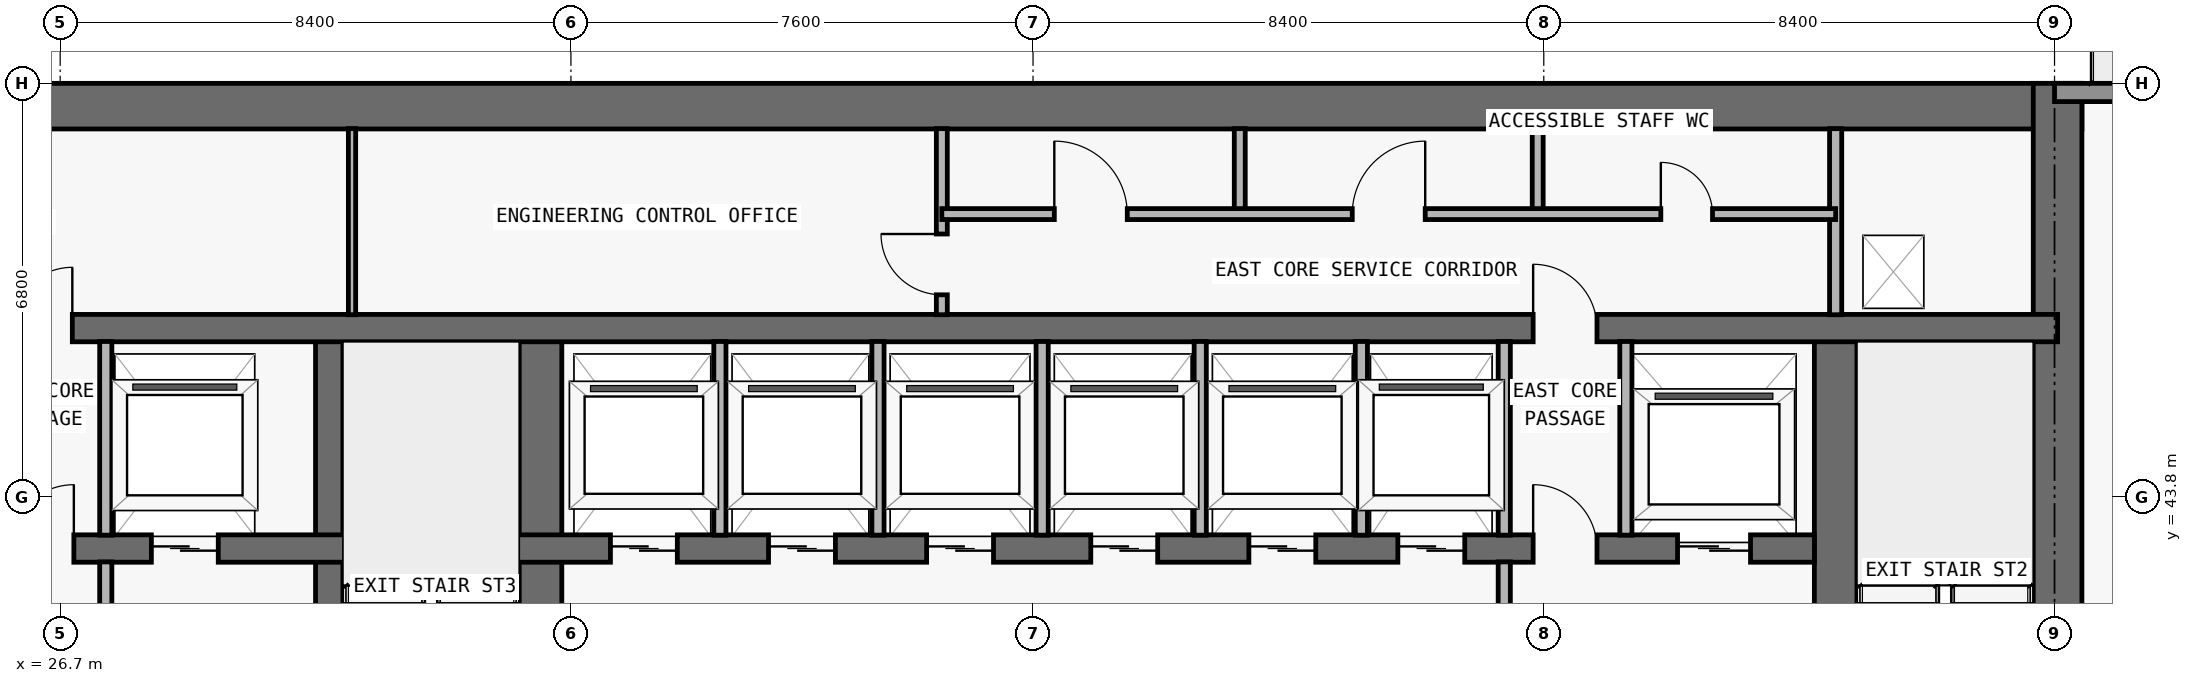
"""IFC4 building model, lengths in metres.
Left out: names, types, materials, properties, quantities, classifications, styles, units other than length and angle.
Written with IfcOpenShell. Run it as: python <this file> out.ifc"""

import sys

from ifc_helpers import new_model, si_unit, direction, frame, frame_2d, origin, place, context, subcontext, project, spatial, rectangle, extrude, element, fill, save


model = new_model("IFC4")
c1 = context("Model", 3, precision=1e-05, world=origin(), true_north=direction((0.0, 1.0)))
c2 = subcontext(c1, "Body", "Model", "MODEL_VIEW")
j1 = project(units=[si_unit("LENGTHUNIT", "METRE"), si_unit("PLANEANGLEUNIT", "RADIAN")], contexts=[c1])
p1 = place(None, origin())
s1 = spatial("IfcSite", under=j1, at=p1, CompositionType="ELEMENT")
p2 = place(p1, origin())
s2 = spatial("IfcBuilding", under=s1, at=p2, CompositionType="ELEMENT")
p3 = place(p2, frame((0.0, 0.0, 97.8)))
s3 = spatial("IfcBuildingStorey", under=s2, at=p3, CompositionType="ELEMENT", Elevation=97.8)
p4 = place(p3, frame((17.85, 50.225, 0.0), z_axis=(0.0, 0.0, 1.0), x_axis=(1.0, 0.0, 0.0)))
e1 = element("IfcWall", 1, at=p4, inside=s3, PredefinedType="SHEAR", context=c2, shape_type="SweptSolid", body=[
    extrude(rectangle(XDim=42.1, YDim=0.75, at=frame_2d((21.05, 0.0))), origin(), (0.0, 0.0, 1.0), 4.55),
])
p5 = place(p3, frame((59.55, 36.55, 0.0), z_axis=(0.0, 0.0, 1.0), x_axis=(0.0, 1.0, 0.0)))
e2 = element("IfcWall", 2, at=p5, inside=s3, PredefinedType="SHEAR", context=c2, shape_type="SweptSolid", body=[
    extrude(rectangle(XDim=14.05, YDim=0.8, at=frame_2d((7.025, 0.0))), origin(), (0.0, 0.0, 1.0), 4.55),
])
p6 = place(p3, frame((55.9, 36.95, 0.0), z_axis=(0.0, 0.0, 1.0), x_axis=(0.0, 1.0, 0.0)))
e3 = element("IfcWall", 3, at=p6, inside=s3, PredefinedType="SHEAR", context=c2, shape_type="SweptSolid", body=[
    extrude(rectangle(XDim=9.625, YDim=0.7, at=frame_2d((4.812, 0.0))), origin(), (0.0, 0.0, 1.0), 4.55),
])
p7 = place(p6, frame((0.6, 0.0, 0.0)))
e4 = element("IfcOpeningElement", 4, at=p7, cuts=e3, PredefinedType="OPENING", context=c2, shape_type="SweptSolid", body=[
    extrude(rectangle(XDim=1.1, YDim=2.15, at=frame_2d((0.55, 1.075))), frame((0.0, 0.36, 0.0), z_axis=(0.0, -1.0, 0.0), x_axis=(1.0, 0.0, 0.0)), (0.0, 0.0, 1.0), 0.72),
])
p8 = place(p3, frame((31.125, 36.95, 0.0), z_axis=(0.0, 0.0, 1.0), x_axis=(0.0, 1.0, 0.0)))
e5 = element("IfcWall", 5, at=p8, inside=s3, PredefinedType="SHEAR", context=c2, shape_type="SweptSolid", body=[
    extrude(rectangle(XDim=9.625, YDim=0.45, at=frame_2d((4.812, 0.0))), origin(), (0.0, 0.0, 1.0), 4.55),
])
p9 = place(p3, frame((34.6, 36.95, 0.0), z_axis=(0.0, 0.0, 1.0), x_axis=(0.0, 1.0, 0.0)))
e6 = element("IfcWall", 6, at=p9, inside=s3, PredefinedType="SHEAR", context=c2, shape_type="SweptSolid", body=[
    extrude(rectangle(XDim=9.625, YDim=0.7, at=frame_2d((4.812, 0.0))), origin(), (0.0, 0.0, 1.0), 4.55),
])
p10 = place(p3, frame((22.25, 42.95, 0.0), z_axis=(0.0, 0.0, 1.0), x_axis=(1.0, 0.0, 0.0)))
e7 = element("IfcWall", 7, at=p10, inside=s3, PredefinedType="SHEAR", context=c2, shape_type="SweptSolid", body=[
    extrude(rectangle(XDim=33.3, YDim=0.45, at=frame_2d((16.65, 0.0))), origin(), (0.0, 0.0, 1.0), 4.55),
])
p11 = place(p10, frame((1.05, 0.0, 0.0)))
e8 = element("IfcOpeningElement", 8, at=p11, cuts=e7, PredefinedType="OPENING", context=c2, shape_type="SweptSolid", body=[
    extrude(rectangle(XDim=1.2, YDim=2.2, at=frame_2d((0.6, 1.1))), frame((0.0, 0.235, 0.0), z_axis=(0.0, -1.0, 0.0), x_axis=(1.0, 0.0, 0.0)), (0.0, 0.0, 1.0), 0.47),
])
p12 = place(p10, frame((31.05, 0.0, 0.0)))
e9 = element("IfcOpeningElement", 9, at=p12, cuts=e7, PredefinedType="OPENING", context=c2, shape_type="SweptSolid", body=[
    extrude(rectangle(XDim=1.2, YDim=2.2, at=frame_2d((0.6, 1.1))), frame((0.0, 0.235, 0.0), z_axis=(0.0, -1.0, 0.0), x_axis=(1.0, 0.0, 0.0)), (0.0, 0.0, 1.0), 0.47),
])
p13 = place(p10, frame((13.5, 0.0, 0.0)))
e10 = element("IfcOpeningElement", 10, at=p13, cuts=e7, PredefinedType="OPENING", context=c2, shape_type="SweptSolid", body=[
    extrude(rectangle(XDim=1.1, YDim=2.2, at=frame_2d((0.55, 1.1))), frame((0.0, 0.235, 0.0), z_axis=(0.0, -1.0, 0.0), x_axis=(1.0, 0.0, 0.0)), (0.0, 0.0, 1.0), 0.47),
])
p14 = place(p10, frame((16.1, 0.0, 0.0)))
e11 = element("IfcOpeningElement", 11, at=p14, cuts=e7, PredefinedType="OPENING", context=c2, shape_type="SweptSolid", body=[
    extrude(rectangle(XDim=1.1, YDim=2.2, at=frame_2d((0.55, 1.1))), frame((0.0, 0.235, 0.0), z_axis=(0.0, -1.0, 0.0), x_axis=(1.0, 0.0, 0.0)), (0.0, 0.0, 1.0), 0.47),
])
p15 = place(p10, frame((18.7, 0.0, 0.0)))
e12 = element("IfcOpeningElement", 12, at=p15, cuts=e7, PredefinedType="OPENING", context=c2, shape_type="SweptSolid", body=[
    extrude(rectangle(XDim=1.1, YDim=2.2, at=frame_2d((0.55, 1.1))), frame((0.0, 0.235, 0.0), z_axis=(0.0, -1.0, 0.0), x_axis=(1.0, 0.0, 0.0)), (0.0, 0.0, 1.0), 0.47),
])
p16 = place(p10, frame((21.4, 0.0, 0.0)))
e13 = element("IfcOpeningElement", 13, at=p16, cuts=e7, PredefinedType="OPENING", context=c2, shape_type="SweptSolid", body=[
    extrude(rectangle(XDim=1.1, YDim=2.2, at=frame_2d((0.55, 1.1))), frame((0.0, 0.235, 0.0), z_axis=(0.0, -1.0, 0.0), x_axis=(1.0, 0.0, 0.0)), (0.0, 0.0, 1.0), 0.47),
])
p17 = place(p10, frame((24.0, 0.0, 0.0)))
e14 = element("IfcOpeningElement", 14, at=p17, cuts=e7, PredefinedType="OPENING", context=c2, shape_type="SweptSolid", body=[
    extrude(rectangle(XDim=1.1, YDim=2.2, at=frame_2d((0.55, 1.1))), frame((0.0, 0.235, 0.0), z_axis=(0.0, -1.0, 0.0), x_axis=(1.0, 0.0, 0.0)), (0.0, 0.0, 1.0), 0.47),
])
p18 = place(p10, frame((26.45, 0.0, 0.0)))
e15 = element("IfcOpeningElement", 15, at=p18, cuts=e7, PredefinedType="OPENING", context=c2, shape_type="SweptSolid", body=[
    extrude(rectangle(XDim=1.1, YDim=2.2, at=frame_2d((0.55, 1.1))), frame((0.0, 0.235, 0.0), z_axis=(0.0, -1.0, 0.0), x_axis=(1.0, 0.0, 0.0)), (0.0, 0.0, 1.0), 0.47),
])
p19 = place(p10, frame((5.95, 0.0, 0.0)))
e16 = element("IfcOpeningElement", 16, at=p19, cuts=e7, PredefinedType="OPENING", context=c2, shape_type="SweptSolid", body=[
    extrude(rectangle(XDim=1.1, YDim=2.2, at=frame_2d((0.55, 1.1))), frame((0.0, 0.235, 0.0), z_axis=(0.0, -1.0, 0.0), x_axis=(1.0, 0.0, 0.0)), (0.0, 0.0, 1.0), 0.47),
])
p20 = place(p10, frame((3.625, 0.0, 0.0)))
e17 = element("IfcOpeningElement", 17, at=p20, cuts=e7, PredefinedType="OPENING", context=c2, shape_type="SweptSolid", body=[
    extrude(rectangle(XDim=1.05, YDim=2.15, at=frame_2d((0.525, 1.075))), frame((0.0, 0.235, 0.0), z_axis=(0.0, -1.0, 0.0), x_axis=(1.0, 0.0, 0.0)), (0.0, 0.0, 1.0), 0.47),
])
p21 = place(p10, frame((28.675, 0.0, 0.0)))
e18 = element("IfcOpeningElement", 18, at=p21, cuts=e7, PredefinedType="OPENING", context=c2, shape_type="SweptSolid", body=[
    extrude(rectangle(XDim=1.05, YDim=2.15, at=frame_2d((0.525, 1.075))), frame((0.0, 0.235, 0.0), z_axis=(0.0, -1.0, 0.0), x_axis=(1.0, 0.0, 0.0)), (0.0, 0.0, 1.0), 0.47),
])
p22 = place(p3, frame((18.25, 46.575, 0.0), z_axis=(0.0, 0.0, 1.0), x_axis=(1.0, 0.0, 0.0)))
e19 = element("IfcWall", 19, at=p22, inside=s3, PredefinedType="SHEAR", context=c2, shape_type="SweptSolid", body=[
    extrude(rectangle(XDim=41.3, YDim=0.45, at=frame_2d((20.65, 0.0))), origin(), (0.0, 0.0, 1.0), 4.55),
])
p23 = place(p22, frame((7.65, 0.0, 0.0)))
e20 = element("IfcOpeningElement", 20, at=p23, cuts=e19, PredefinedType="OPENING", context=c2, shape_type="SweptSolid", body=[
    extrude(rectangle(XDim=1.0, YDim=2.2, at=frame_2d((0.5, 1.1))), frame((0.0, 0.235, 0.0), z_axis=(0.0, -1.0, 0.0), x_axis=(1.0, 0.0, 0.0)), (0.0, 0.0, 1.0), 0.47),
])
p24 = place(p22, frame((32.675, 0.0, 0.0)))
e21 = element("IfcOpeningElement", 21, at=p24, cuts=e19, PredefinedType="OPENING", context=c2, shape_type="SweptSolid", body=[
    extrude(rectangle(XDim=1.05, YDim=2.15, at=frame_2d((0.525, 1.075))), frame((0.0, 0.235, 0.0), z_axis=(0.0, -1.0, 0.0), x_axis=(1.0, 0.0, 0.0)), (0.0, 0.0, 1.0), 0.47),
])
p25 = place(p3, frame((59.5, 50.45, 0.0), z_axis=(0.0, 0.0, 1.0), x_axis=(1.0, 0.0, 0.0)))
e22 = element("IfcWall", 22, at=p25, inside=s3, PredefinedType="STANDARD", context=c2, shape_type="SweptSolid", body=[
    extrude(rectangle(XDim=10.6, YDim=0.3, at=frame_2d((5.3, 0.0))), origin(), (0.0, 0.0, 1.0), 4.55),
])
p26 = place(p25, frame((4.3, 0.0, 0.0)))
e23 = element("IfcOpeningElement", 23, at=p26, cuts=e22, PredefinedType="OPENING", context=c2, shape_type="SweptSolid", body=[
    extrude(rectangle(XDim=2.0, YDim=2.3, at=frame_2d((1.0, 1.15))), frame((0.0, 0.16, 0.0), z_axis=(0.0, -1.0, 0.0), x_axis=(1.0, 0.0, 0.0)), (0.0, 0.0, 1.0), 0.32),
])
p27 = place(p3, frame((27.45, 37.345, 0.0), z_axis=(0.0, 0.0, 1.0), x_axis=(0.0, 1.0, 0.0)))
e24 = element("IfcWall", 24, at=p27, inside=s3, PredefinedType="PARTITIONING", context=c2, shape_type="SweptSolid", body=[
    extrude(rectangle(XDim=5.385, YDim=0.2, at=frame_2d((2.692, 0.0))), origin(), (0.0, 0.0, 1.0), 4.55),
])
p28 = place(p3, frame((27.45, 43.17, 0.0), z_axis=(0.0, 0.0, 1.0), x_axis=(0.0, 1.0, 0.0)))
e25 = element("IfcWall", 25, at=p28, inside=s3, PredefinedType="PARTITIONING", context=c2, shape_type="SweptSolid", body=[
    extrude(rectangle(XDim=3.185, YDim=0.2, at=frame_2d((1.593, 0.0))), origin(), (0.0, 0.0, 1.0), 4.55),
])
p29 = place(p3, frame((31.5, 46.795, 0.0), z_axis=(0.0, 0.0, 1.0), x_axis=(0.0, 1.0, 0.0)))
e26 = element("IfcWall", 26, at=p29, inside=s3, PredefinedType="PARTITIONING", context=c2, shape_type="SweptSolid", body=[
    extrude(rectangle(XDim=3.06, YDim=0.12, at=frame_2d((1.53, 0.0))), origin(), (0.0, 0.0, 1.0), 4.55),
])
for number, where, z_axis, x_axis in (
    (27, (37.55, 43.17, 0.0), (0.0, 0.0, 1.0), (0.0, 1.0, 0.0)),
    (28, (40.15, 43.17, 0.0), (0.0, 0.0, 1.0), (0.0, 1.0, 0.0)),
):
    element("IfcWall", number, at=place(p3, frame(where, z_axis=z_axis, x_axis=x_axis)), inside=s3, PredefinedType="PARTITIONING", context=c2, shape_type="SweptSolid", body=[
        extrude(rectangle(XDim=3.185, YDim=0.2, at=frame_2d((1.593, 0.0))), origin(), (0.0, 0.0, 1.0), 4.55),
    ])
p30 = place(p3, frame((41.2, 46.795, 0.0), z_axis=(0.0, 0.0, 1.0), x_axis=(0.0, 1.0, 0.0)))
e29 = element("IfcWall", 29, at=p30, inside=s3, PredefinedType="PARTITIONING", context=c2, shape_type="SweptSolid", body=[
    extrude(rectangle(XDim=3.06, YDim=0.18, at=frame_2d((1.53, 0.0))), origin(), (0.0, 0.0, 1.0), 4.55),
])
p31 = place(p30, frame((0.327, 0.0, 0.0)))
e30 = element("IfcOpeningElement", 30, at=p31, cuts=e29, PredefinedType="OPENING", context=c2, shape_type="SweptSolid", body=[
    extrude(rectangle(XDim=1.0, YDim=2.2, at=frame_2d((0.5, 1.1))), frame((0.0, 0.1, 0.0), z_axis=(0.0, -1.0, 0.0), x_axis=(1.0, 0.0, 0.0)), (0.0, 0.0, 1.0), 0.2),
])
for number, where, z_axis, x_axis in (
    (31, (42.85, 43.17, 0.0), (0.0, 0.0, 1.0), (0.0, 1.0, 0.0)),
    (32, (45.45, 43.17, 0.0), (0.0, 0.0, 1.0), (0.0, 1.0, 0.0)),
):
    element("IfcWall", number, at=place(p3, frame(where, z_axis=z_axis, x_axis=x_axis)), inside=s3, PredefinedType="PARTITIONING", context=c2, shape_type="SweptSolid", body=[
        extrude(rectangle(XDim=3.185, YDim=0.2, at=frame_2d((1.593, 0.0))), origin(), (0.0, 0.0, 1.0), 4.55),
    ])
p32 = place(p3, frame((46.1, 48.45, 0.0), z_axis=(0.0, 0.0, 1.0), x_axis=(0.0, 1.0, 0.0)))
e33 = element("IfcWall", 33, at=p32, inside=s3, PredefinedType="PARTITIONING", context=c2, shape_type="SweptSolid", body=[
    extrude(rectangle(XDim=1.405, YDim=0.18, at=frame_2d((0.703, 0.0))), origin(), (0.0, 0.0, 1.0), 4.55),
])
p33 = place(p3, frame((48.1, 43.17, 0.0), z_axis=(0.0, 0.0, 1.0), x_axis=(0.0, 1.0, 0.0)))
e34 = element("IfcWall", 34, at=p33, inside=s3, PredefinedType="PARTITIONING", context=c2, shape_type="SweptSolid", body=[
    extrude(rectangle(XDim=3.185, YDim=0.2, at=frame_2d((1.593, 0.0))), origin(), (0.0, 0.0, 1.0), 4.55),
])
p34 = place(p3, frame((50.45, 37.345, 0.0), z_axis=(0.0, 0.0, 1.0), x_axis=(0.0, 1.0, 0.0)))
e35 = element("IfcWall", 35, at=p34, inside=s3, PredefinedType="PARTITIONING", context=c2, shape_type="SweptSolid", body=[
    extrude(rectangle(XDim=5.385, YDim=0.2, at=frame_2d((2.692, 0.0))), origin(), (0.0, 0.0, 1.0), 4.55),
])
p35 = place(p3, frame((50.45, 43.17, 0.0), z_axis=(0.0, 0.0, 1.0), x_axis=(0.0, 1.0, 0.0)))
e36 = element("IfcWall", 36, at=p35, inside=s3, PredefinedType="PARTITIONING", context=c2, shape_type="SweptSolid", body=[
    extrude(rectangle(XDim=3.185, YDim=0.2, at=frame_2d((1.593, 0.0))), origin(), (0.0, 0.0, 1.0), 4.55),
])
p36 = place(p3, frame((51.0, 48.45, 0.0), z_axis=(0.0, 0.0, 1.0), x_axis=(0.0, 1.0, 0.0)))
e37 = element("IfcWall", 37, at=p36, inside=s3, PredefinedType="PARTITIONING", context=c2, shape_type="SweptSolid", body=[
    extrude(rectangle(XDim=1.405, YDim=0.18, at=frame_2d((0.703, 0.0))), origin(), (0.0, 0.0, 1.0), 4.55),
])
p37 = place(p3, frame((52.45, 43.17, 0.0), z_axis=(0.0, 0.0, 1.0), x_axis=(0.0, 1.0, 0.0)))
e38 = element("IfcWall", 38, at=p37, inside=s3, PredefinedType="PARTITIONING", context=c2, shape_type="SweptSolid", body=[
    extrude(rectangle(XDim=3.185, YDim=0.2, at=frame_2d((1.593, 0.0))), origin(), (0.0, 0.0, 1.0), 4.55),
])
p38 = place(p3, frame((55.9, 46.795, 0.0), z_axis=(0.0, 0.0, 1.0), x_axis=(0.0, 1.0, 0.0)))
e39 = element("IfcWall", 39, at=p38, inside=s3, PredefinedType="PARTITIONING", context=c2, shape_type="SweptSolid", body=[
    extrude(rectangle(XDim=3.06, YDim=0.2, at=frame_2d((1.53, 0.0))), origin(), (0.0, 0.0, 1.0), 4.55),
])
p39 = place(p3, frame((41.2, 48.45, 0.0), z_axis=(0.0, 0.0, 1.0), x_axis=(1.0, 0.0, 0.0)))
e40 = element("IfcWall", 40, at=p39, inside=s3, PredefinedType="PARTITIONING", context=c2, shape_type="SweptSolid", body=[
    extrude(rectangle(XDim=14.7, YDim=0.18, at=frame_2d((7.35, 0.0))), origin(), (0.0, 0.0, 1.0), 4.55),
])
p40 = place(p39, frame((1.85, 0.0, 0.0)))
e41 = element("IfcOpeningElement", 41, at=p40, cuts=e40, PredefinedType="OPENING", context=c2, shape_type="SweptSolid", body=[
    extrude(rectangle(XDim=1.2, YDim=2.2, at=frame_2d((0.6, 1.1))), frame((0.0, 0.1, 0.0), z_axis=(0.0, -1.0, 0.0), x_axis=(1.0, 0.0, 0.0)), (0.0, 0.0, 1.0), 0.2),
])
p41 = place(p39, frame((6.75, 0.0, 0.0)))
e42 = element("IfcOpeningElement", 42, at=p41, cuts=e40, PredefinedType="OPENING", context=c2, shape_type="SweptSolid", body=[
    extrude(rectangle(XDim=1.2, YDim=2.2, at=frame_2d((0.6, 1.1))), frame((0.0, 0.1, 0.0), z_axis=(0.0, -1.0, 0.0), x_axis=(1.0, 0.0, 0.0)), (0.0, 0.0, 1.0), 0.2),
])
p42 = place(p39, frame((11.825, 0.0, 0.0)))
e43 = element("IfcOpeningElement", 43, at=p42, cuts=e40, PredefinedType="OPENING", context=c2, shape_type="SweptSolid", body=[
    extrude(rectangle(XDim=0.85, YDim=2.1, at=frame_2d((0.425, 1.05))), frame((0.0, 0.1, 0.0), z_axis=(0.0, -1.0, 0.0), x_axis=(1.0, 0.0, 0.0)), (0.0, 0.0, 1.0), 0.2),
])
p43 = place(p12, origin())
e44 = element("IfcDoor", 44, at=p43, inside=s3, OperationType="DOUBLE_DOOR_SLIDING", PredefinedType="DOOR", context=c2, shape_type="SweptSolid", body=[
    extrude(rectangle(XDim=1.2, YDim=2.2, at=frame_2d((0.6, 1.1))), frame((0.0, 0.025, 0.0), z_axis=(0.0, -1.0, 0.0), x_axis=(1.0, 0.0, 0.0)), (0.0, 0.0, 1.0), 0.05),
])
fill(e9, e44)
p44 = place(p13, origin())
e45 = element("IfcDoor", 45, at=p44, inside=s3, OperationType="DOUBLE_DOOR_SLIDING", PredefinedType="DOOR", context=c2, shape_type="SweptSolid", body=[
    extrude(rectangle(XDim=1.1, YDim=2.2, at=frame_2d((0.55, 1.1))), frame((0.0, 0.025, 0.0), z_axis=(0.0, -1.0, 0.0), x_axis=(1.0, 0.0, 0.0)), (0.0, 0.0, 1.0), 0.05),
])
fill(e10, e45)
p45 = place(p14, origin())
e46 = element("IfcDoor", 46, at=p45, inside=s3, OperationType="DOUBLE_DOOR_SLIDING", PredefinedType="DOOR", context=c2, shape_type="SweptSolid", body=[
    extrude(rectangle(XDim=1.1, YDim=2.2, at=frame_2d((0.55, 1.1))), frame((0.0, 0.025, 0.0), z_axis=(0.0, -1.0, 0.0), x_axis=(1.0, 0.0, 0.0)), (0.0, 0.0, 1.0), 0.05),
])
fill(e11, e46)
p46 = place(p15, origin())
e47 = element("IfcDoor", 47, at=p46, inside=s3, OperationType="DOUBLE_DOOR_SLIDING", PredefinedType="DOOR", context=c2, shape_type="SweptSolid", body=[
    extrude(rectangle(XDim=1.1, YDim=2.2, at=frame_2d((0.55, 1.1))), frame((0.0, 0.025, 0.0), z_axis=(0.0, -1.0, 0.0), x_axis=(1.0, 0.0, 0.0)), (0.0, 0.0, 1.0), 0.05),
])
fill(e12, e47)
p47 = place(p16, origin())
e48 = element("IfcDoor", 48, at=p47, inside=s3, OperationType="DOUBLE_DOOR_SLIDING", PredefinedType="DOOR", context=c2, shape_type="SweptSolid", body=[
    extrude(rectangle(XDim=1.1, YDim=2.2, at=frame_2d((0.55, 1.1))), frame((0.0, 0.025, 0.0), z_axis=(0.0, -1.0, 0.0), x_axis=(1.0, 0.0, 0.0)), (0.0, 0.0, 1.0), 0.05),
])
fill(e13, e48)
p48 = place(p17, origin())
e49 = element("IfcDoor", 49, at=p48, inside=s3, OperationType="DOUBLE_DOOR_SLIDING", PredefinedType="DOOR", context=c2, shape_type="SweptSolid", body=[
    extrude(rectangle(XDim=1.1, YDim=2.2, at=frame_2d((0.55, 1.1))), frame((0.0, 0.025, 0.0), z_axis=(0.0, -1.0, 0.0), x_axis=(1.0, 0.0, 0.0)), (0.0, 0.0, 1.0), 0.05),
])
fill(e14, e49)
p49 = place(p18, origin())
e50 = element("IfcDoor", 50, at=p49, inside=s3, OperationType="DOUBLE_DOOR_SLIDING", PredefinedType="DOOR", context=c2, shape_type="SweptSolid", body=[
    extrude(rectangle(XDim=1.1, YDim=2.2, at=frame_2d((0.55, 1.1))), frame((0.0, 0.025, 0.0), z_axis=(0.0, -1.0, 0.0), x_axis=(1.0, 0.0, 0.0)), (0.0, 0.0, 1.0), 0.05),
])
fill(e15, e50)
p50 = place(p19, origin())
e51 = element("IfcDoor", 51, at=p50, inside=s3, OperationType="DOUBLE_DOOR_SLIDING", PredefinedType="DOOR", context=c2, shape_type="SweptSolid", body=[
    extrude(rectangle(XDim=1.1, YDim=2.2, at=frame_2d((0.55, 1.1))), frame((0.0, 0.025, 0.0), z_axis=(0.0, -1.0, 0.0), x_axis=(1.0, 0.0, 0.0)), (0.0, 0.0, 1.0), 0.05),
])
fill(e16, e51)
p51 = place(p20, origin())
e52 = element("IfcDoor", 52, at=p51, inside=s3, OperationType="SINGLE_SWING_RIGHT", PredefinedType="DOOR", context=c2, shape_type="SweptSolid", body=[
    extrude(rectangle(XDim=1.05, YDim=2.15, at=frame_2d((0.525, 1.075))), frame((0.0, 0.025, 0.0), z_axis=(0.0, -1.0, 0.0), x_axis=(1.0, 0.0, 0.0)), (0.0, 0.0, 1.0), 0.05),
])
fill(e17, e52)
p52 = place(p21, origin())
e53 = element("IfcDoor", 53, at=p52, inside=s3, OperationType="SINGLE_SWING_LEFT", PredefinedType="DOOR", context=c2, shape_type="SweptSolid", body=[
    extrude(rectangle(XDim=1.05, YDim=2.15, at=frame_2d((0.525, 1.075))), frame((0.0, 0.025, 0.0), z_axis=(0.0, -1.0, 0.0), x_axis=(1.0, 0.0, 0.0)), (0.0, 0.0, 1.0), 0.05),
])
fill(e18, e53)
p53 = place(p23, origin())
e54 = element("IfcDoor", 54, at=p53, inside=s3, OperationType="SINGLE_SWING_RIGHT", PredefinedType="DOOR", context=c2, shape_type="SweptSolid", body=[
    extrude(rectangle(XDim=1.0, YDim=2.2, at=frame_2d((0.5, 1.1))), frame((0.0, 0.025, 0.0), z_axis=(0.0, -1.0, 0.0), x_axis=(1.0, 0.0, 0.0)), (0.0, 0.0, 1.0), 0.05),
])
fill(e20, e54)
p54 = place(p24, origin())
e55 = element("IfcDoor", 55, at=p54, inside=s3, OperationType="SINGLE_SWING_LEFT", PredefinedType="DOOR", context=c2, shape_type="SweptSolid", body=[
    extrude(rectangle(XDim=1.05, YDim=2.15, at=frame_2d((0.525, 1.075))), frame((0.0, 0.025, 0.0), z_axis=(0.0, -1.0, 0.0), x_axis=(1.0, 0.0, 0.0)), (0.0, 0.0, 1.0), 0.05),
])
fill(e21, e55)
p55 = place(p31, origin())
e56 = element("IfcDoor", 56, at=p55, inside=s3, OperationType="SINGLE_SWING_RIGHT", PredefinedType="DOOR", context=c2, shape_type="SweptSolid", body=[
    extrude(rectangle(XDim=1.0, YDim=2.2, at=frame_2d((0.5, 1.1))), frame((0.0, 0.025, 0.0), z_axis=(0.0, -1.0, 0.0), x_axis=(1.0, 0.0, 0.0)), (0.0, 0.0, 1.0), 0.05),
])
fill(e30, e56)
p56 = place(p40, origin())
e57 = element("IfcDoor", 57, at=p56, inside=s3, OperationType="SINGLE_SWING_LEFT", PredefinedType="DOOR", context=c2, shape_type="SweptSolid", body=[
    extrude(rectangle(XDim=1.2, YDim=2.2, at=frame_2d((0.6, 1.1))), frame((0.0, 0.025, 0.0), z_axis=(0.0, -1.0, 0.0), x_axis=(1.0, 0.0, 0.0)), (0.0, 0.0, 1.0), 0.05),
])
fill(e41, e57)
p57 = place(p41, origin())
e58 = element("IfcDoor", 58, at=p57, inside=s3, OperationType="SINGLE_SWING_RIGHT", PredefinedType="DOOR", context=c2, shape_type="SweptSolid", body=[
    extrude(rectangle(XDim=1.2, YDim=2.2, at=frame_2d((0.6, 1.1))), frame((0.0, 0.025, 0.0), z_axis=(0.0, -1.0, 0.0), x_axis=(1.0, 0.0, 0.0)), (0.0, 0.0, 1.0), 0.05),
])
fill(e42, e58)
p58 = place(p42, origin())
e59 = element("IfcDoor", 59, at=p58, inside=s3, OperationType="SINGLE_SWING_LEFT", PredefinedType="DOOR", context=c2, shape_type="SweptSolid", body=[
    extrude(rectangle(XDim=0.85, YDim=2.1, at=frame_2d((0.425, 1.05))), frame((0.0, 0.025, 0.0), z_axis=(0.0, -1.0, 0.0), x_axis=(1.0, 0.0, 0.0)), (0.0, 0.0, 1.0), 0.05),
])
fill(e43, e59)
save(model, sys.argv[1])
